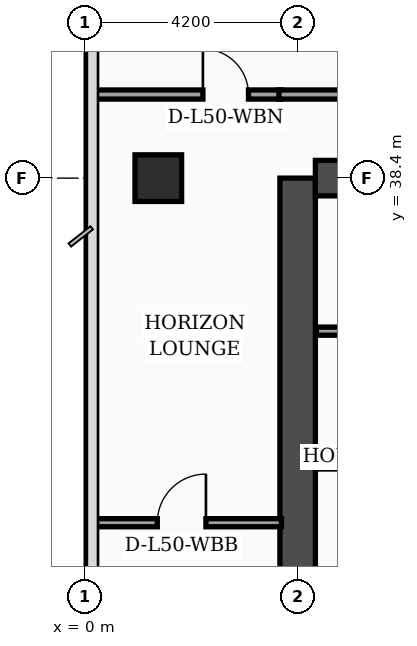
"""IFC4 building model, lengths in metres.
Left out: names, types, materials, properties, quantities, classifications, styles, units other than length and angle.
Written with IfcOpenShell. Run it as: python <this file> out.ifc"""

import sys

from ifc_helpers import new_model, si_unit, direction, frame, frame_2d, origin, origin_2d, place, context, subcontext, project, spatial, rectangle, extrude, element, fill, save


model = new_model("IFC4")
c1 = context("Model", 3, precision=1e-05, world=origin(), true_north=direction((0.0, 1.0)))
c2 = subcontext(c1, "Body", "Model", "MODEL_VIEW")
j1 = project(units=[si_unit("LENGTHUNIT", "METRE"), si_unit("PLANEANGLEUNIT", "RADIAN")], contexts=[c1])
p1 = place(None, origin())
s1 = spatial("IfcSite", under=j1, at=p1, CompositionType="ELEMENT")
p2 = place(p1, origin())
s2 = spatial("IfcBuilding", under=s1, at=p2, CompositionType="ELEMENT")
p3 = place(p2, frame((0.0, 0.0, 203.4)))
s3 = spatial("IfcBuildingStorey", under=s2, at=p3, CompositionType="ELEMENT", Elevation=203.4)
p4 = place(p3, frame((4.2, 16.8, 0.0), z_axis=(0.0, 0.0, 1.0), x_axis=(0.0, 1.0, 0.0)))
e1 = element("IfcWall", 1, at=p4, inside=s3, PredefinedType="SHEAR", context=c2, shape_type="SweptSolid", body=[
    extrude(rectangle(XDim=21.6, YDim=0.7, at=frame_2d((10.8, 0.0))), origin(), (0.0, 0.0, 1.0), 3.56),
])
p5 = place(p3, frame((4.55, 38.4, 0.0), z_axis=(0.0, 0.0, 1.0), x_axis=(1.0, 0.0, 0.0)))
e2 = element("IfcWall", 2, at=p5, inside=s3, PredefinedType="SHEAR", context=c2, shape_type="SweptSolid", body=[
    extrude(rectangle(XDim=10.1, YDim=0.7, at=frame_2d((5.05, 0.0))), origin(), (0.0, 0.0, 1.0), 3.56),
])
p6 = place(p3, frame((1.45, 38.4, 0.0), z_axis=(0.0, 0.0, 1.0), x_axis=(1.0, 0.0, 0.0)))
e3 = element("IfcColumn", 3, at=p6, inside=s3, PredefinedType="COLUMN", context=c2, shape_type="SweptSolid", body=[
    extrude(rectangle(XDim=0.92, YDim=0.92, at=origin_2d()), origin(), (0.0, 0.0, 1.0), 3.56),
])
p7 = place(p3, frame((4.57, 32.78, 0.0), z_axis=(0.0, 0.0, 1.0), x_axis=(1.0, 0.0, 0.0)))
e4 = element("IfcWall", 4, at=p7, inside=s3, PredefinedType="SOLIDWALL", context=c2, shape_type="SweptSolid", body=[
    extrude(rectangle(XDim=4.85, YDim=0.24, at=frame_2d((2.425, 0.0))), origin(), (0.0, 0.0, 1.0), 3.19),
])
p8 = place(p3, frame((4.57, 35.38, 0.0), z_axis=(0.0, 0.0, 1.0), x_axis=(1.0, 0.0, 0.0)))
e5 = element("IfcWall", 5, at=p8, inside=s3, PredefinedType="PARTITIONING", context=c2, shape_type="SweptSolid", body=[
    extrude(rectangle(XDim=4.85, YDim=0.16, at=frame_2d((2.425, 0.0))), origin(), (0.0, 0.0, 1.0), 3.56),
])
p9 = place(p8, frame((1.3, 0.0, 0.0)))
e6 = element("IfcOpeningElement", 6, at=p9, cuts=e5, PredefinedType="OPENING", context=c2, shape_type="SweptSolid", body=[
    extrude(rectangle(XDim=0.98, YDim=2.15, at=frame_2d((0.49, 1.075))), frame((0.0, 0.09, 0.0), z_axis=(0.0, -1.0, 0.0), x_axis=(1.0, 0.0, 0.0)), (0.0, 0.0, 1.0), 0.18),
])
p10 = place(p3, frame((0.08, 31.6, 0.0), z_axis=(0.0, 0.0, 1.0), x_axis=(1.0, 0.0, 0.0)))
e7 = element("IfcWall", 7, at=p10, inside=s3, PredefinedType="PARTITIONING", context=c2, shape_type="SweptSolid", body=[
    extrude(rectangle(XDim=3.8, YDim=0.16, at=frame_2d((1.9, 0.0))), origin(), (0.0, 0.0, 1.0), 3.09),
])
p11 = place(p10, frame((1.35, 0.0, 0.0)))
e8 = element("IfcOpeningElement", 8, at=p11, cuts=e7, PredefinedType="OPENING", context=c2, shape_type="SweptSolid", body=[
    extrude(rectangle(XDim=0.96, YDim=2.2, at=frame_2d((0.48, 1.1))), frame((0.0, 0.09, 0.0), z_axis=(0.0, -1.0, 0.0), x_axis=(1.0, 0.0, 0.0)), (0.0, 0.0, 1.0), 0.18),
])
p12 = place(p3, frame((0.08, 40.05, 0.0), z_axis=(0.0, 0.0, 1.0), x_axis=(1.0, 0.0, 0.0)))
e9 = element("IfcWall", 9, at=p12, inside=s3, PredefinedType="PARTITIONING", context=c2, shape_type="SweptSolid", body=[
    extrude(rectangle(XDim=3.8, YDim=0.18, at=frame_2d((1.9, 0.0))), origin(), (0.0, 0.0, 1.0), 2.94),
])
p13 = place(p12, frame((2.25, 0.0, 0.0)))
e10 = element("IfcOpeningElement", 10, at=p13, cuts=e9, PredefinedType="OPENING", context=c2, shape_type="SweptSolid", body=[
    extrude(rectangle(XDim=0.9, YDim=2.15, at=frame_2d((0.45, 1.075))), frame((0.0, 0.1, 0.0), z_axis=(0.0, -1.0, 0.0), x_axis=(1.0, 0.0, 0.0)), (0.0, 0.0, 1.0), 0.2),
])
p14 = place(p3, frame((3.83, 40.05, 0.0), z_axis=(0.0, 0.0, 1.0), x_axis=(1.0, 0.0, 0.0)))
e11 = element("IfcWall", 11, at=p14, inside=s3, PredefinedType="PARTITIONING", context=c2, shape_type="SweptSolid", body=[
    extrude(rectangle(XDim=11.32, YDim=0.18, at=frame_2d((5.66, 0.0))), origin(), (0.0, 0.0, 1.0), 2.94),
])
p15 = place(p11, origin())
e12 = element("IfcDoor", 12, at=p15, inside=s3, OperationType="SINGLE_SWING_RIGHT", PredefinedType="DOOR", context=c2, shape_type="SweptSolid", body=[
    extrude(rectangle(XDim=0.96, YDim=2.2, at=frame_2d((0.48, 1.1))), frame((0.0, 0.025, 0.0), z_axis=(0.0, -1.0, 0.0), x_axis=(1.0, 0.0, 0.0)), (0.0, 0.0, 1.0), 0.05),
])
fill(e8, e12)
p16 = place(p13, origin())
e13 = element("IfcDoor", 13, at=p16, inside=s3, OperationType="SINGLE_SWING_LEFT", PredefinedType="DOOR", context=c2, shape_type="SweptSolid", body=[
    extrude(rectangle(XDim=0.9, YDim=2.15, at=frame_2d((0.45, 1.075))), frame((0.0, 0.025, 0.0), z_axis=(0.0, -1.0, 0.0), x_axis=(1.0, 0.0, 0.0)), (0.0, 0.0, 1.0), 0.05),
])
fill(e10, e13)
save(model, sys.argv[1])
